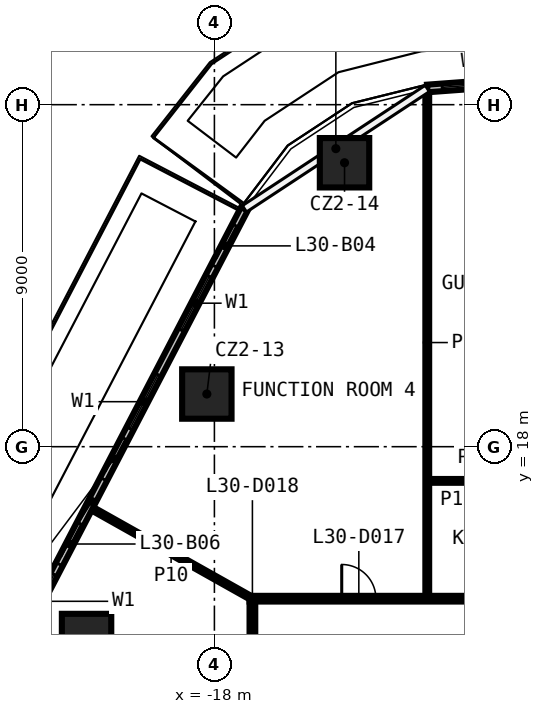
"""IFC4 building model, lengths in metres.
Left out: names, types, materials, properties, quantities, classifications, styles, units other than length and angle.
Written with IfcOpenShell. Run it as: python <this file> out.ifc"""

import sys

from ifc_helpers import new_model, si_unit, direction, frame, frame_2d, origin, origin_2d, place, context, subcontext, project, spatial, rectangle, extrude, element, fill, save


model = new_model("IFC4")
c1 = context("Model", 3, precision=1e-05, world=origin(), true_north=direction((0.0, 1.0)))
c2 = subcontext(c1, "Body", "Model", "MODEL_VIEW")
j1 = project(units=[si_unit("LENGTHUNIT", "METRE"), si_unit("PLANEANGLEUNIT", "RADIAN")], contexts=[c1])
p1 = place(None, origin())
s1 = spatial("IfcSite", under=j1, at=p1, CompositionType="ELEMENT")
p2 = place(p1, origin())
s2 = spatial("IfcBuilding", under=s1, at=p2, CompositionType="ELEMENT")
p3 = place(p2, frame((0.0, 0.0, 135.9)))
s3 = spatial("IfcBuildingStorey", under=s2, at=p3, CompositionType="ELEMENT", Elevation=135.9)
for number, where, z_axis, x_axis in (
    (1, (-21.364, 12.952, 0.0), (0.0, 0.0, 1.0), (1.0, 0.0, 0.0)),
    (2, (-18.199, 19.386, 0.0), (0.0, 0.0, 1.0), (1.0, 0.0, 0.0)),
    (3, (-14.576, 25.472, 0.0), (0.0, 0.0, 1.0), (1.0, 0.0, 0.0)),
):
    element("IfcColumn", number, at=place(p3, frame(where, z_axis=z_axis, x_axis=x_axis)), inside=s3, PredefinedType="COLUMN", context=c2, shape_type="SweptSolid", body=[
        extrude(rectangle(XDim=1.3, YDim=1.3, at=origin_2d()), origin(), (0.0, 0.0, 1.0), 3.3),
    ])
p4 = place(p3, frame((-17.075, 14.0, 0.0), z_axis=(0.0, 0.0, 1.0), x_axis=(1.0, 0.0, 0.0)))
e4 = element("IfcWall", 4, at=p4, inside=s3, PredefinedType="PARTITIONING", context=c2, shape_type="SweptSolid", body=[
    extrude(rectangle(XDim=34.15, YDim=0.15, at=frame_2d((17.075, 0.0))), origin(), (0.0, 0.0, 1.0), 3.3),
])
p5 = place(p4, frame((10.954, 0.0, 0.0)))
e5 = element("IfcOpeningElement", 5, at=p5, cuts=e4, PredefinedType="OPENING", context=c2, shape_type="SweptSolid", body=[
    extrude(rectangle(XDim=0.9, YDim=2.1, at=frame_2d((0.45, 1.05))), frame((0.0, 0.085, 0.0), z_axis=(0.0, -1.0, 0.0), x_axis=(1.0, 0.0, 0.0)), (0.0, 0.0, 1.0), 0.17),
])
p6 = place(p4, frame((7.617, 0.0, 0.0)))
e6 = element("IfcOpeningElement", 6, at=p6, cuts=e4, PredefinedType="OPENING", context=c2, shape_type="SweptSolid", body=[
    extrude(rectangle(XDim=1.0, YDim=2.1, at=frame_2d((0.5, 1.05))), frame((0.0, 0.085, 0.0), z_axis=(0.0, -1.0, 0.0), x_axis=(1.0, 0.0, 0.0)), (0.0, 0.0, 1.0), 0.17),
])
p7 = place(p4, frame((2.425, 0.0, 0.0)))
e7 = element("IfcOpeningElement", 7, at=p7, cuts=e4, PredefinedType="OPENING", context=c2, shape_type="SweptSolid", body=[
    extrude(rectangle(XDim=0.9, YDim=2.1, at=frame_2d((0.45, 1.05))), frame((0.0, 0.085, 0.0), z_axis=(0.0, -1.0, 0.0), x_axis=(1.0, 0.0, 0.0)), (0.0, 0.0, 1.0), 0.17),
])
p8 = place(p3, frame((-12.349, 17.1, 0.0), z_axis=(0.0, 0.0, 1.0), x_axis=(1.0, 0.0, 0.0)))
e8 = element("IfcWall", 8, at=p8, inside=s3, PredefinedType="PARTITIONING", context=c2, shape_type="SweptSolid", body=[
    extrude(rectangle(XDim=2.4, YDim=0.1, at=frame_2d((1.2, 0.0))), origin(), (0.0, 0.0, 1.0), 3.3),
])
p9 = place(p3, frame((-12.399, 14.075, 0.0), z_axis=(0.0, 0.0, 1.0), x_axis=(0.0, 1.0, 0.0)))
e9 = element("IfcWall", 9, at=p9, inside=s3, PredefinedType="PARTITIONING", context=c2, shape_type="SweptSolid", body=[
    extrude(rectangle(XDim=13.331, YDim=0.1, at=frame_2d((6.666, 0.0))), origin(), (0.0, 0.0, 1.0), 3.3),
])
p10 = place(p3, frame((-17.0, -13.925, 0.0), z_axis=(0.0, 0.0, 1.0), x_axis=(0.0, 1.0, 0.0)))
e10 = element("IfcWall", 10, at=p10, inside=s3, PredefinedType="PARTITIONING", context=c2, shape_type="SweptSolid", body=[
    extrude(rectangle(XDim=27.85, YDim=0.15, at=frame_2d((13.925, 0.0))), origin(), (0.0, 0.0, 1.0), 3.3),
])
p11 = place(p10, frame((11.107, 0.0, 0.0)))
e11 = element("IfcOpeningElement", 11, at=p11, cuts=e10, PredefinedType="OPENING", context=c2, shape_type="SweptSolid", body=[
    extrude(rectangle(XDim=0.9, YDim=2.1, at=frame_2d((0.45, 1.05))), frame((0.0, 0.085, 0.0), z_axis=(0.0, -1.0, 0.0), x_axis=(1.0, 0.0, 0.0)), (0.0, 0.0, 1.0), 0.17),
])
p12 = place(p10, frame((25.204, 0.0, 0.0)))
e12 = element("IfcOpeningElement", 12, at=p12, cuts=e10, PredefinedType="OPENING", context=c2, shape_type="SweptSolid", body=[
    extrude(rectangle(XDim=0.9, YDim=2.1, at=frame_2d((0.45, 1.05))), frame((0.0, 0.085, 0.0), z_axis=(0.0, -1.0, 0.0), x_axis=(1.0, 0.0, 0.0)), (0.0, 0.0, 1.0), 0.17),
])
p13 = place(p10, frame((18.833, 0.0, 0.0)))
e13 = element("IfcOpeningElement", 13, at=p13, cuts=e10, PredefinedType="OPENING", context=c2, shape_type="SweptSolid", body=[
    extrude(rectangle(XDim=1.0, YDim=2.1, at=frame_2d((0.5, 1.05))), frame((0.0, 0.085, 0.0), z_axis=(0.0, -1.0, 0.0), x_axis=(1.0, 0.0, 0.0)), (0.0, 0.0, 1.0), 0.17),
])
p14 = place(p10, frame((17.31, 0.0, 0.0)))
e14 = element("IfcOpeningElement", 14, at=p14, cuts=e10, PredefinedType="OPENING", context=c2, shape_type="SweptSolid", body=[
    extrude(rectangle(XDim=1.0, YDim=2.1, at=frame_2d((0.5, 1.05))), frame((0.0, 0.085, 0.0), z_axis=(0.0, -1.0, 0.0), x_axis=(1.0, 0.0, 0.0)), (0.0, 0.0, 1.0), 0.17),
])
p15 = place(p3, frame((-21.279, 16.405, 0.0), z_axis=(0.0, 0.0, 1.0), x_axis=(0.871729599924, -0.489987249443, 0.0)))
e15 = element("IfcWall", 15, at=p15, inside=s3, PredefinedType="PARTITIONING", context=c2, shape_type="SweptSolid", body=[
    extrude(rectangle(XDim=4.908, YDim=0.1, at=frame_2d((2.454, 0.0))), origin(), (0.0, 0.0, 1.0), 3.3),
])
p16 = place(p3, frame((-7.917, 27.757, 0.0), z_axis=(0.0, 0.0, 1.0), x_axis=(-0.997291417846, -0.073551532206, 0.0)))
e16 = element("IfcWall", 16, at=p16, inside=s3, PredefinedType="SOLIDWALL", context=c2, shape_type="SweptSolid", body=[
    extrude(rectangle(XDim=4.494, YDim=0.2, at=frame_2d((2.247, 0.0))), origin(), (0.0, 0.0, 1.0), 3.3),
])
p17 = place(p16, frame((2.5, 0.0, 0.6)))
e17 = element("IfcOpeningElement", 17, at=p17, cuts=e16, PredefinedType="OPENING", context=c2, shape_type="SweptSolid", body=[
    extrude(rectangle(XDim=1.6, YDim=2.4, at=frame_2d((0.8, 1.2))), frame((0.0, 0.11, 0.0), z_axis=(0.0, -1.0, 0.0), x_axis=(1.0, 0.0, 0.0)), (0.0, 0.0, 1.0), 0.22),
])
p18 = place(p16, frame((1.0, 0.0, 0.0)))
e18 = element("IfcOpeningElement", 18, at=p18, cuts=e16, PredefinedType="OPENING", context=c2, shape_type="SweptSolid", body=[
    extrude(rectangle(XDim=1.2, YDim=2.4, at=frame_2d((0.6, 1.2))), frame((0.0, 0.11, 0.0), z_axis=(0.0, -1.0, 0.0), x_axis=(1.0, 0.0, 0.0)), (0.0, 0.0, 1.0), 0.22),
])
p19 = place(p3, frame((-17.21, 24.26, 0.0), z_axis=(0.0, 0.0, 1.0), x_axis=(-0.461902936619, -0.886930480445, 0.0)))
e19 = element("IfcWall", 19, at=p19, inside=s3, PredefinedType="SOLIDWALL", context=c2, shape_type="SweptSolid", body=[
    extrude(rectangle(XDim=22.113, YDim=0.2, at=frame_2d((11.057, 0.0))), origin(), (0.0, 0.0, 1.0), 3.3),
])
p20 = place(p19, frame((2.0, 0.0, 0.6)))
e20 = element("IfcOpeningElement", 20, at=p20, cuts=e19, PredefinedType="OPENING", context=c2, shape_type="SweptSolid", body=[
    extrude(rectangle(XDim=1.6, YDim=2.4, at=frame_2d((0.8, 1.2))), frame((0.0, 0.11, 0.0), z_axis=(0.0, -1.0, 0.0), x_axis=(1.0, 0.0, 0.0)), (0.0, 0.0, 1.0), 0.22),
])
p21 = place(p19, frame((0.5, 0.0, 0.0)))
e21 = element("IfcOpeningElement", 21, at=p21, cuts=e19, PredefinedType="OPENING", context=c2, shape_type="SweptSolid", body=[
    extrude(rectangle(XDim=1.2, YDim=2.4, at=frame_2d((0.6, 1.2))), frame((0.0, 0.11, 0.0), z_axis=(0.0, -1.0, 0.0), x_axis=(1.0, 0.0, 0.0)), (0.0, 0.0, 1.0), 0.22),
])
p22 = place(p19, frame((4.923, 0.0, 0.6)))
e22 = element("IfcOpeningElement", 22, at=p22, cuts=e19, PredefinedType="OPENING", context=c2, shape_type="SweptSolid", body=[
    extrude(rectangle(XDim=1.6, YDim=2.4, at=frame_2d((0.8, 1.2))), frame((0.0, 0.11, 0.0), z_axis=(0.0, -1.0, 0.0), x_axis=(1.0, 0.0, 0.0)), (0.0, 0.0, 1.0), 0.22),
])
p23 = place(p19, frame((6.823, 0.0, 0.0)))
e23 = element("IfcOpeningElement", 23, at=p23, cuts=e19, PredefinedType="OPENING", context=c2, shape_type="SweptSolid", body=[
    extrude(rectangle(XDim=1.2, YDim=2.4, at=frame_2d((0.6, 1.2))), frame((0.0, 0.11, 0.0), z_axis=(0.0, -1.0, 0.0), x_axis=(1.0, 0.0, 0.0)), (0.0, 0.0, 1.0), 0.22),
])
p24 = place(p19, frame((10.845, 0.0, 0.6)))
e24 = element("IfcOpeningElement", 24, at=p24, cuts=e19, PredefinedType="OPENING", context=c2, shape_type="SweptSolid", body=[
    extrude(rectangle(XDim=1.6, YDim=2.4, at=frame_2d((0.8, 1.2))), frame((0.0, 0.11, 0.0), z_axis=(0.0, -1.0, 0.0), x_axis=(1.0, 0.0, 0.0)), (0.0, 0.0, 1.0), 0.22),
])
p25 = place(p19, frame((9.345, 0.0, 0.0)))
e25 = element("IfcOpeningElement", 25, at=p25, cuts=e19, PredefinedType="OPENING", context=c2, shape_type="SweptSolid", body=[
    extrude(rectangle(XDim=1.2, YDim=2.4, at=frame_2d((0.6, 1.2))), frame((0.0, 0.11, 0.0), z_axis=(0.0, -1.0, 0.0), x_axis=(1.0, 0.0, 0.0)), (0.0, 0.0, 1.0), 0.22),
])
p26 = place(p19, frame((15.268, 0.0, 0.6)))
e26 = element("IfcOpeningElement", 26, at=p26, cuts=e19, PredefinedType="OPENING", context=c2, shape_type="SweptSolid", body=[
    extrude(rectangle(XDim=1.6, YDim=2.4, at=frame_2d((0.8, 1.2))), frame((0.0, 0.11, 0.0), z_axis=(0.0, -1.0, 0.0), x_axis=(1.0, 0.0, 0.0)), (0.0, 0.0, 1.0), 0.22),
])
p27 = place(p19, frame((13.768, 0.0, 0.0)))
e27 = element("IfcOpeningElement", 27, at=p27, cuts=e19, PredefinedType="OPENING", context=c2, shape_type="SweptSolid", body=[
    extrude(rectangle(XDim=1.2, YDim=2.4, at=frame_2d((0.6, 1.2))), frame((0.0, 0.11, 0.0), z_axis=(0.0, -1.0, 0.0), x_axis=(1.0, 0.0, 0.0)), (0.0, 0.0, 1.0), 0.22),
])
p28 = place(p19, frame((18.19, 0.0, 0.6)))
e28 = element("IfcOpeningElement", 28, at=p28, cuts=e19, PredefinedType="OPENING", context=c2, shape_type="SweptSolid", body=[
    extrude(rectangle(XDim=1.6, YDim=2.4, at=frame_2d((0.8, 1.2))), frame((0.0, 0.11, 0.0), z_axis=(0.0, -1.0, 0.0), x_axis=(1.0, 0.0, 0.0)), (0.0, 0.0, 1.0), 0.22),
])
p29 = place(p19, frame((20.09, 0.0, 0.0)))
e29 = element("IfcOpeningElement", 29, at=p29, cuts=e19, PredefinedType="OPENING", context=c2, shape_type="SweptSolid", body=[
    extrude(rectangle(XDim=1.2, YDim=2.4, at=frame_2d((0.6, 1.2))), frame((0.0, 0.11, 0.0), z_axis=(0.0, -1.0, 0.0), x_axis=(1.0, 0.0, 0.0)), (0.0, 0.0, 1.0), 0.22),
])
p30 = place(p7, origin())
e30 = element("IfcDoor", 30, at=p30, inside=s3, OperationType="SINGLE_SWING_RIGHT", PredefinedType="DOOR", context=c2, shape_type="SweptSolid", body=[
    extrude(rectangle(XDim=0.9, YDim=2.1, at=frame_2d((0.45, 1.05))), frame((0.0, 0.025, 0.0), z_axis=(0.0, -1.0, 0.0), x_axis=(1.0, 0.0, 0.0)), (0.0, 0.0, 1.0), 0.05),
])
fill(e7, e30)
p31 = place(p17, origin())
e31 = element("IfcWindow", 31, at=p31, inside=s3, PartitioningType="SINGLE_PANEL", PredefinedType="WINDOW", context=c2, shape_type="SweptSolid", body=[
    extrude(rectangle(XDim=1.6, YDim=2.4, at=frame_2d((0.8, 1.2))), frame((0.0, 0.03, 0.0), z_axis=(0.0, -1.0, 0.0), x_axis=(1.0, 0.0, 0.0)), (0.0, 0.0, 1.0), 0.06),
])
fill(e17, e31)
p32 = place(p20, origin())
e32 = element("IfcWindow", 32, at=p32, inside=s3, PartitioningType="SINGLE_PANEL", PredefinedType="WINDOW", context=c2, shape_type="SweptSolid", body=[
    extrude(rectangle(XDim=1.6, YDim=2.4, at=frame_2d((0.8, 1.2))), frame((0.0, 0.03, 0.0), z_axis=(0.0, -1.0, 0.0), x_axis=(1.0, 0.0, 0.0)), (0.0, 0.0, 1.0), 0.06),
])
fill(e20, e32)
p33 = place(p21, origin())
e33 = element("IfcDoor", 33, at=p33, inside=s3, OperationType="SLIDING_TO_LEFT", PredefinedType="DOOR", context=c2, shape_type="SweptSolid", body=[
    extrude(rectangle(XDim=1.2, YDim=2.4, at=frame_2d((0.6, 1.2))), frame((0.0, 0.025, 0.0), z_axis=(0.0, -1.0, 0.0), x_axis=(1.0, 0.0, 0.0)), (0.0, 0.0, 1.0), 0.05),
])
fill(e21, e33)
p34 = place(p22, origin())
e34 = element("IfcWindow", 34, at=p34, inside=s3, PartitioningType="SINGLE_PANEL", PredefinedType="WINDOW", context=c2, shape_type="SweptSolid", body=[
    extrude(rectangle(XDim=1.6, YDim=2.4, at=frame_2d((0.8, 1.2))), frame((0.0, 0.03, 0.0), z_axis=(0.0, -1.0, 0.0), x_axis=(1.0, 0.0, 0.0)), (0.0, 0.0, 1.0), 0.06),
])
fill(e22, e34)
p35 = place(p23, origin())
e35 = element("IfcDoor", 35, at=p35, inside=s3, OperationType="SLIDING_TO_LEFT", PredefinedType="DOOR", context=c2, shape_type="SweptSolid", body=[
    extrude(rectangle(XDim=1.2, YDim=2.4, at=frame_2d((0.6, 1.2))), frame((0.0, 0.025, 0.0), z_axis=(0.0, -1.0, 0.0), x_axis=(1.0, 0.0, 0.0)), (0.0, 0.0, 1.0), 0.05),
])
fill(e23, e35)
p36 = place(p24, origin())
e36 = element("IfcWindow", 36, at=p36, inside=s3, PartitioningType="SINGLE_PANEL", PredefinedType="WINDOW", context=c2, shape_type="SweptSolid", body=[
    extrude(rectangle(XDim=1.6, YDim=2.4, at=frame_2d((0.8, 1.2))), frame((0.0, 0.03, 0.0), z_axis=(0.0, -1.0, 0.0), x_axis=(1.0, 0.0, 0.0)), (0.0, 0.0, 1.0), 0.06),
])
fill(e24, e36)
p37 = place(p25, origin())
e37 = element("IfcDoor", 37, at=p37, inside=s3, OperationType="SLIDING_TO_LEFT", PredefinedType="DOOR", context=c2, shape_type="SweptSolid", body=[
    extrude(rectangle(XDim=1.2, YDim=2.4, at=frame_2d((0.6, 1.2))), frame((0.0, 0.025, 0.0), z_axis=(0.0, -1.0, 0.0), x_axis=(1.0, 0.0, 0.0)), (0.0, 0.0, 1.0), 0.05),
])
fill(e25, e37)
save(model, sys.argv[1])
